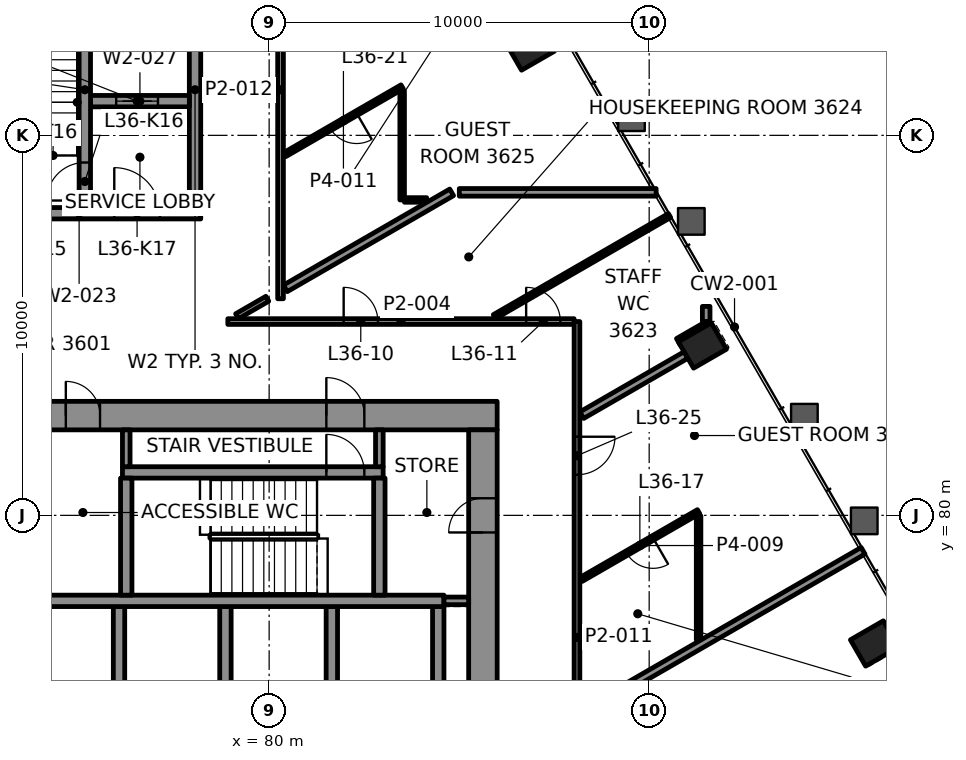
"""IFC4 building model, lengths in metres.
Left out: names, types, materials, properties, quantities, classifications, styles, units other than length and angle.
Written with IfcOpenShell. Run it as: python <this file> out.ifc"""

import sys

from ifc_helpers import new_model, si_unit, direction, frame, frame_2d, origin, origin_2d, place, context, subcontext, project, spatial, rectangle, hollow_rectangle, extrude, element, fill, save


model = new_model("IFC4")
c1 = context("Model", 3, precision=1e-05, world=origin(), true_north=direction((0.0, 1.0)))
c2 = subcontext(c1, "Body", "Model", "MODEL_VIEW")
j1 = project(units=[si_unit("LENGTHUNIT", "METRE"), si_unit("PLANEANGLEUNIT", "RADIAN")], contexts=[c1])
p1 = place(None, origin())
s1 = spatial("IfcSite", under=j1, at=p1, CompositionType="ELEMENT")
p2 = place(p1, origin())
s2 = spatial("IfcBuilding", under=s1, at=p2, CompositionType="ELEMENT")
p3 = place(p2, frame((0.0, 0.0, 159.7)))
s3 = spatial("IfcBuildingStorey", under=s2, at=p3, CompositionType="ELEMENT", Elevation=159.7)
for number, where, z_axis, x_axis in (
    (1, (95.928, 76.628, -0.0), (0.0, 0.0, 1.0), (-0.5, 0.866, 0.0)),
    (2, (91.402, 84.469, -0.0), (0.0, 0.0, 1.0), (-0.5, 0.866, 0.0)),
    (3, (86.875, 92.31, -0.0), (0.0, 0.0, 1.0), (-0.5, 0.866, 0.0)),
):
    element("IfcColumn", number, at=place(p3, frame(where, z_axis=z_axis, x_axis=x_axis)), inside=s3, PredefinedType="COLUMN", context=c2, shape_type="SweptSolid", body=[
        extrude(hollow_rectangle(XDim=0.8, YDim=1.0, WallThickness=0.05, at=origin_2d()), origin(), (0.0, 0.0, 1.0), 3.9),
    ])
p4 = place(p3, frame((64.0, 82.625, 0.0), z_axis=(0.0, 0.0, 1.0), x_axis=(1.0, 0.0, 0.0)))
e4 = element("IfcWall", 4, at=p4, inside=s3, PredefinedType="SHEAR", context=c2, shape_type="SweptSolid", body=[
    extrude(rectangle(XDim=22.0, YDim=0.75, at=frame_2d((11.0, 0.0))), origin(), (0.0, 0.0, 1.0), 3.7),
])
p5 = place(p4, frame((3.695, 0.0, 0.0)))
e5 = element("IfcOpeningElement", 5, at=p5, cuts=e4, PredefinedType="OPENING", context=c2, shape_type="SweptSolid", body=[
    extrude(rectangle(XDim=1.0, YDim=2.1, at=frame_2d((0.5, 1.05))), frame((0.0, 0.385, 0.0), z_axis=(0.0, -1.0, 0.0), x_axis=(1.0, 0.0, 0.0)), (0.0, 0.0, 1.0), 0.77),
])
p6 = place(p4, frame((17.505, 0.0, 0.0)))
e6 = element("IfcOpeningElement", 6, at=p6, cuts=e4, PredefinedType="OPENING", context=c2, shape_type="SweptSolid", body=[
    extrude(rectangle(XDim=1.0, YDim=2.1, at=frame_2d((0.5, 1.05))), frame((0.0, 0.385, 0.0), z_axis=(0.0, -1.0, 0.0), x_axis=(1.0, 0.0, 0.0)), (0.0, 0.0, 1.0), 0.77),
])
p7 = place(p4, frame((10.65, 0.0, 0.0)))
e7 = element("IfcOpeningElement", 7, at=p7, cuts=e4, PredefinedType="OPENING", context=c2, shape_type="SweptSolid", body=[
    extrude(rectangle(XDim=0.9, YDim=2.1, at=frame_2d((0.45, 1.05))), frame((0.0, 0.385, 0.0), z_axis=(0.0, -1.0, 0.0), x_axis=(1.0, 0.0, 0.0)), (0.0, 0.0, 1.0), 0.77),
])
p8 = place(p3, frame((85.625, 67.75, 0.0), z_axis=(0.0, 0.0, 1.0), x_axis=(0.0, 1.0, 0.0)))
e8 = element("IfcWall", 8, at=p8, inside=s3, PredefinedType="SHEAR", context=c2, shape_type="SweptSolid", body=[
    extrude(rectangle(XDim=14.5, YDim=0.75, at=frame_2d((7.25, 0.0))), origin(), (0.0, 0.0, 1.0), 3.7),
])
p9 = place(p8, frame((4.65, 0.0, 0.0)))
e9 = element("IfcOpeningElement", 9, at=p9, cuts=e8, PredefinedType="OPENING", context=c2, shape_type="SweptSolid", body=[
    extrude(rectangle(XDim=1.8, YDim=2.1, at=frame_2d((0.9, 1.05))), frame((0.0, 0.385, 0.0), z_axis=(0.0, -1.0, 0.0), x_axis=(1.0, 0.0, 0.0)), (0.0, 0.0, 1.0), 0.77),
])
p10 = place(p8, frame((11.8, 0.0, 0.0)))
e10 = element("IfcOpeningElement", 10, at=p10, cuts=e8, PredefinedType="OPENING", context=c2, shape_type="SweptSolid", body=[
    extrude(rectangle(XDim=0.9, YDim=2.1, at=frame_2d((0.45, 1.05))), frame((0.0, 0.385, 0.0), z_axis=(0.0, -1.0, 0.0), x_axis=(1.0, 0.0, 0.0)), (0.0, 0.0, 1.0), 0.77),
])
for number, where, z_axis, x_axis in (
    (11, (76.05, 75.0, 0.0), (0.0, 0.0, 1.0), (0.0, 1.0, 0.0)),
    (12, (78.85, 75.0, 0.0), (0.0, 0.0, 1.0), (0.0, 1.0, 0.0)),
    (13, (81.65, 75.0, 0.0), (0.0, 0.0, 1.0), (0.0, 1.0, 0.0)),
    (14, (84.45, 75.0, 0.0), (0.0, 0.0, 1.0), (0.0, 1.0, 0.0)),
):
    element("IfcWall", number, at=place(p3, frame(where, z_axis=z_axis, x_axis=x_axis)), inside=s3, PredefinedType="SHEAR", context=c2, shape_type="SweptSolid", body=[
        extrude(rectangle(XDim=2.6, YDim=0.3, at=frame_2d((1.3, 0.0))), origin(), (0.0, 0.0, 1.0), 3.7),
    ])
p11 = place(p3, frame((67.15, 77.75, 0.0), z_axis=(0.0, 0.0, 1.0), x_axis=(1.0, 0.0, 0.0)))
e15 = element("IfcWall", 15, at=p11, inside=s3, PredefinedType="SHEAR", context=c2, shape_type="SweptSolid", body=[
    extrude(rectangle(XDim=17.45, YDim=0.3, at=frame_2d((8.725, 0.0))), origin(), (0.0, 0.0, 1.0), 3.7),
])
p12 = place(p11, frame((0.545, 0.0, 0.0)))
e16 = element("IfcOpeningElement", 16, at=p12, cuts=e15, PredefinedType="OPENING", context=c2, shape_type="SweptSolid", body=[
    extrude(rectangle(XDim=1.0, YDim=2.1, at=frame_2d((0.5, 1.05))), frame((0.0, 0.16, 0.0), z_axis=(0.0, -1.0, 0.0), x_axis=(1.0, 0.0, 0.0)), (0.0, 0.0, 1.0), 0.32),
])
p13 = place(p3, frame((76.14, 81.13, 0.0), z_axis=(0.0, 0.0, 1.0), x_axis=(1.0, 0.0, 0.0)))
e17 = element("IfcWall", 17, at=p13, inside=s3, PredefinedType="SHEAR", context=c2, shape_type="SweptSolid", body=[
    extrude(rectangle(XDim=6.86, YDim=0.3, at=frame_2d((3.43, 0.0))), origin(), (0.0, 0.0, 1.0), 3.7),
])
p14 = place(p13, frame((5.365, 0.0, 0.0)))
e18 = element("IfcOpeningElement", 18, at=p14, cuts=e17, PredefinedType="OPENING", context=c2, shape_type="SweptSolid", body=[
    extrude(rectangle(XDim=1.0, YDim=2.1, at=frame_2d((0.5, 1.05))), frame((0.0, 0.16, 0.0), z_axis=(0.0, -1.0, 0.0), x_axis=(1.0, 0.0, 0.0)), (0.0, 0.0, 1.0), 0.32),
])
for number, where, z_axis, x_axis in (
    (19, (76.24, 77.9, 0.0), (0.0, 0.0, 1.0), (0.0, 1.0, 0.0)),
    (20, (82.9, 77.9, 0.0), (0.0, 0.0, 1.0), (0.0, 1.0, 0.0)),
):
    element("IfcWall", number, at=place(p3, frame(where, z_axis=z_axis, x_axis=x_axis)), inside=s3, PredefinedType="SHEAR", context=c2, shape_type="SweptSolid", body=[
        extrude(rectangle(XDim=3.08, YDim=0.3, at=frame_2d((1.54, 0.0))), origin(), (0.0, 0.0, 1.0), 3.7),
    ])
p15 = place(p3, frame((71.8, 87.95, 0.0), z_axis=(0.0, 0.0, 1.0), x_axis=(1.0, 0.0, 0.0)))
e21 = element("IfcWall", 21, at=p15, inside=s3, PredefinedType="SHEAR", context=c2, shape_type="SweptSolid", body=[
    extrude(rectangle(XDim=6.4, YDim=0.3, at=frame_2d((3.2, 0.0))), origin(), (0.0, 0.0, 1.0), 3.7),
])
p16 = place(p15, frame((1.325, 0.0, 0.0)))
e22 = element("IfcOpeningElement", 22, at=p16, cuts=e21, PredefinedType="OPENING", context=c2, shape_type="SweptSolid", body=[
    extrude(rectangle(XDim=1.0, YDim=2.1, at=frame_2d((0.5, 1.05))), frame((0.0, 0.16, 0.0), z_axis=(0.0, -1.0, 0.0), x_axis=(1.0, 0.0, 0.0)), (0.0, 0.0, 1.0), 0.32),
])
p17 = place(p15, frame((4.125, 0.0, 0.0)))
e23 = element("IfcOpeningElement", 23, at=p17, cuts=e21, PredefinedType="OPENING", context=c2, shape_type="SweptSolid", body=[
    extrude(rectangle(XDim=1.2, YDim=2.1, at=frame_2d((0.6, 1.05))), frame((0.0, 0.16, 0.0), z_axis=(0.0, -1.0, 0.0), x_axis=(1.0, 0.0, 0.0)), (0.0, 0.0, 1.0), 0.32),
])
p18 = place(p3, frame((78.05, 88.1, 0.0), z_axis=(0.0, 0.0, 1.0), x_axis=(0.0, 1.0, 0.0)))
e24 = element("IfcWall", 24, at=p18, inside=s3, PredefinedType="SHEAR", context=c2, shape_type="SweptSolid", body=[
    extrude(rectangle(XDim=6.2, YDim=0.3, at=frame_2d((3.1, 0.0))), origin(), (0.0, 0.0, 1.0), 3.7),
])
p19 = place(p3, frame((75.3, 90.9, 0.0), z_axis=(0.0, 0.0, 1.0), x_axis=(1.0, 0.0, 0.0)))
e25 = element("IfcWall", 25, at=p19, inside=s3, PredefinedType="SHEAR", context=c2, shape_type="SweptSolid", body=[
    extrude(rectangle(XDim=2.6, YDim=0.3, at=frame_2d((1.3, 0.0))), origin(), (0.0, 0.0, 1.0), 3.7),
])
p20 = place(p19, frame((0.675, 0.0, 0.0)))
e26 = element("IfcOpeningElement", 26, at=p20, cuts=e25, PredefinedType="OPENING", context=c2, shape_type="SweptSolid", body=[
    extrude(rectangle(XDim=1.1, YDim=2.1, at=frame_2d((0.55, 1.05))), frame((0.0, 0.16, 0.0), z_axis=(0.0, -1.0, 0.0), x_axis=(1.0, 0.0, 0.0)), (0.0, 0.0, 1.0), 0.32),
])
p21 = place(p3, frame((75.15, 88.1, 0.0), z_axis=(0.0, 0.0, 1.0), x_axis=(0.0, 1.0, 0.0)))
e27 = element("IfcWall", 27, at=p21, inside=s3, PredefinedType="SHEAR", context=c2, shape_type="SweptSolid", body=[
    extrude(rectangle(XDim=6.2, YDim=0.3, at=frame_2d((3.1, 0.0))), origin(), (0.0, 0.0, 1.0), 3.7),
])
p22 = place(p21, frame((0.185, 0.0, 0.0)))
e28 = element("IfcOpeningElement", 28, at=p22, cuts=e27, PredefinedType="OPENING", context=c2, shape_type="SweptSolid", body=[
    extrude(rectangle(XDim=1.0, YDim=2.1, at=frame_2d((0.5, 1.05))), frame((0.0, 0.16, 0.0), z_axis=(0.0, -1.0, 0.0), x_axis=(1.0, 0.0, 0.0)), (0.0, 0.0, 1.0), 0.32),
])
p23 = place(p3, frame((78.913, 85.1, 0.0), z_axis=(0.0, 0.0, 1.0), x_axis=(1.0, 0.0, 0.0)))
e29 = element("IfcWall", 29, at=p23, inside=s3, PredefinedType="PARTITIONING", context=c2, shape_type="SweptSolid", body=[
    extrude(rectangle(XDim=9.112, YDim=0.15, at=frame_2d((4.556, 0.0))), origin(), (0.0, 0.0, 1.0), 3.1),
])
p24 = place(p23, frame((3.048, 0.0, 0.0)))
e30 = element("IfcOpeningElement", 30, at=p24, cuts=e29, PredefinedType="OPENING", context=c2, shape_type="SweptSolid", body=[
    extrude(rectangle(XDim=0.9, YDim=2.1, at=frame_2d((0.45, 1.05))), frame((0.0, 0.085, 0.0), z_axis=(0.0, -1.0, 0.0), x_axis=(1.0, 0.0, 0.0)), (0.0, 0.0, 1.0), 0.17),
])
p25 = place(p23, frame((7.85, 0.0, 0.0)))
e31 = element("IfcOpeningElement", 31, at=p25, cuts=e29, PredefinedType="OPENING", context=c2, shape_type="SweptSolid", body=[
    extrude(rectangle(XDim=0.9, YDim=2.1, at=frame_2d((0.45, 1.05))), frame((0.0, 0.085, 0.0), z_axis=(0.0, -1.0, 0.0), x_axis=(1.0, 0.0, 0.0)), (0.0, 0.0, 1.0), 0.17),
])
p26 = place(p3, frame((83.56, 88.3, 0.0), z_axis=(0.0, 0.0, 1.0), x_axis=(1.0, 0.0, 0.0)))
e32 = element("IfcWall", 32, at=p26, inside=s3, PredefinedType="PARTITIONING", context=c2, shape_type="SweptSolid", body=[
    extrude(rectangle(XDim=0.585, YDim=0.12, at=frame_2d((0.292, 0.0))), origin(), (0.0, 0.0, 1.0), 3.1),
])
p27 = place(p3, frame((85.004, 88.5, 0.0), z_axis=(0.0, 0.0, 1.0), x_axis=(1.0, 0.0, 0.0)))
e33 = element("IfcWall", 33, at=p27, inside=s3, PredefinedType="PARTITIONING", context=c2, shape_type="SweptSolid", body=[
    extrude(rectangle(XDim=5.179, YDim=0.2, at=frame_2d((2.59, 0.0))), origin(), (0.0, 0.0, 1.0), 2.865),
])
p28 = place(p3, frame((88.227, 74.795, 0.0), z_axis=(0.0, 0.0, 1.0), x_axis=(0.866017652766, 0.500013424917, 0.0)))
e34 = element("IfcWall", 34, at=p28, inside=s3, PredefinedType="PARTITIONING", context=c2, shape_type="SweptSolid", body=[
    extrude(rectangle(XDim=8.546, YDim=0.2, at=frame_2d((4.273, 0.0))), origin(), (0.0, 0.0, 1.0), 2.865),
])
p29 = place(p3, frame((91.3, 80.098, 0.0), z_axis=(0.0, 0.0, 1.0), x_axis=(-0.866028357664, -0.499994883695, 0.0)))
e35 = element("IfcWall", 35, at=p29, inside=s3, PredefinedType="PARTITIONING", context=c2, shape_type="SweptSolid", body=[
    extrude(rectangle(XDim=3.568, YDim=0.12, at=frame_2d((1.784, 0.0))), origin(), (0.0, 0.0, 1.0), 3.1),
])
p30 = place(p29, frame((1.384, 0.0, 0.0)))
e36 = element("IfcOpeningElement", 36, at=p30, cuts=e35, PredefinedType="OPENING", context=c2, shape_type="SweptSolid", body=[
    extrude(rectangle(XDim=0.8, YDim=2.1, at=frame_2d((0.4, 1.05))), frame((0.0, 0.07, 0.0), z_axis=(0.0, -1.0, 0.0), x_axis=(1.0, 0.0, 0.0)), (0.0, 0.0, 1.0), 0.14),
])
p31 = place(p3, frame((88.227, 82.637, 0.0), z_axis=(0.0, 0.0, 1.0), x_axis=(0.866046892487, 0.499962778628, 0.0)))
e37 = element("IfcWall", 37, at=p31, inside=s3, PredefinedType="PARTITIONING", context=c2, shape_type="SweptSolid", body=[
    extrude(rectangle(XDim=3.166, YDim=0.2, at=frame_2d((1.583, 0.0))), origin(), (0.0, 0.0, 1.0), 3.1),
])
p32 = place(p3, frame((90.769, 84.566, 0.0), z_axis=(0.0, 0.0, 1.0), x_axis=(0.865993035835, 0.500056058743, 0.0)))
e38 = element("IfcWall", 38, at=p32, inside=s3, PredefinedType="PARTITIONING", context=c2, shape_type="SweptSolid", body=[
    extrude(rectangle(XDim=0.845, YDim=0.2, at=frame_2d((0.422, 0.0))), origin(), (0.0, 0.0, 1.0), 2.865),
])
p33 = place(p3, frame((85.928, 85.23, 0.0), z_axis=(0.0, 0.0, 1.0), x_axis=(0.866037319036, 0.49997936161, 0.0)))
e39 = element("IfcWall", 39, at=p33, inside=s3, PredefinedType="PARTITIONING", context=c2, shape_type="SweptSolid", body=[
    extrude(rectangle(XDim=5.32, YDim=0.12, at=frame_2d((2.66, 0.0))), origin(), (0.0, 0.0, 1.0), 2.865),
])
p34 = place(p3, frame((79.156, 85.24, 0.0), z_axis=(0.0, 0.0, 1.0), x_axis=(0.866013213425, 0.500021113727, 0.0)))
e40 = element("IfcWall", 40, at=p34, inside=s3, PredefinedType="PARTITIONING", context=c2, shape_type="SweptSolid", body=[
    extrude(rectangle(XDim=0.92, YDim=0.15, at=frame_2d((0.46, 0.0))), origin(), (0.0, 0.0, 1.0), 3.1),
])
p35 = place(p3, frame((80.427, 85.974, 0.0), z_axis=(0.0, 0.0, 1.0), x_axis=(0.866031085144, 0.499990159468, 0.0)))
e41 = element("IfcWall", 41, at=p35, inside=s3, PredefinedType="PARTITIONING", context=c2, shape_type="SweptSolid", body=[
    extrude(rectangle(XDim=5.052, YDim=0.2, at=frame_2d((2.526, 0.0))), origin(), (0.0, 0.0, 1.0), 3.1),
])
p36 = place(p3, frame((83.5, 91.277, 0.0), z_axis=(0.0, 0.0, 1.0), x_axis=(-0.866028357664, -0.499994883695, 0.0)))
e42 = element("IfcWall", 42, at=p36, inside=s3, PredefinedType="PARTITIONING", context=c2, shape_type="SweptSolid", body=[
    extrude(rectangle(XDim=3.568, YDim=0.12, at=frame_2d((1.784, 0.0))), origin(), (0.0, 0.0, 1.0), 3.1),
])
p37 = place(p36, frame((1.384, 0.0, 0.0)))
e43 = element("IfcOpeningElement", 43, at=p37, cuts=e42, PredefinedType="OPENING", context=c2, shape_type="SweptSolid", body=[
    extrude(rectangle(XDim=0.8, YDim=2.1, at=frame_2d((0.4, 1.05))), frame((0.0, 0.07, 0.0), z_axis=(0.0, -1.0, 0.0), x_axis=(1.0, 0.0, 0.0)), (0.0, 0.0, 1.0), 0.14),
])
p38 = place(p3, frame((91.5, 85.104, 0.0), z_axis=(0.0, 0.0, 1.0), x_axis=(0.0, 1.0, 0.0)))
e44 = element("IfcWall", 44, at=p38, inside=s3, PredefinedType="PARTITIONING", context=c2, shape_type="SweptSolid", body=[
    extrude(rectangle(XDim=0.395, YDim=0.2, at=frame_2d((0.198, 0.0))), origin(), (0.0, 0.0, 1.0), 3.1),
])
p39 = place(p3, frame((91.3, 76.725, 0.0), z_axis=(0.0, 0.0, 1.0), x_axis=(0.0, 1.0, 0.0)))
e45 = element("IfcWall", 45, at=p39, inside=s3, PredefinedType="PARTITIONING", context=c2, shape_type="SweptSolid", body=[
    extrude(rectangle(XDim=3.264, YDim=0.12, at=frame_2d((1.632, 0.0))), origin(), (0.0, 0.0, 1.0), 3.1),
])
p40 = place(p3, frame((88.1, 85.1, 0.0), z_axis=(0.0, 0.0, 1.0), x_axis=(0.0, -1.0, 0.0)))
e46 = element("IfcWall", 46, at=p40, inside=s3, PredefinedType="PARTITIONING", context=c2, shape_type="SweptSolid", body=[
    extrude(rectangle(XDim=16.624, YDim=0.15, at=frame_2d((8.312, 0.0))), origin(), (0.0, 0.0, 1.0), 3.1),
])
p41 = place(p40, frame((3.031, 0.0, 0.0)))
e47 = element("IfcOpeningElement", 47, at=p41, cuts=e46, PredefinedType="OPENING", context=c2, shape_type="SweptSolid", body=[
    extrude(rectangle(XDim=1.0, YDim=2.1, at=frame_2d((0.5, 1.05))), frame((0.0, 0.085, 0.0), z_axis=(0.0, -1.0, 0.0), x_axis=(1.0, 0.0, 0.0)), (0.0, 0.0, 1.0), 0.17),
])
p42 = place(p40, frame((10.872, 0.0, 0.0)))
e48 = element("IfcOpeningElement", 48, at=p42, cuts=e46, PredefinedType="OPENING", context=c2, shape_type="SweptSolid", body=[
    extrude(rectangle(XDim=1.0, YDim=2.1, at=frame_2d((0.5, 1.05))), frame((0.0, 0.085, 0.0), z_axis=(0.0, -1.0, 0.0), x_axis=(1.0, 0.0, 0.0)), (0.0, 0.0, 1.0), 0.17),
])
p43 = place(p3, frame((83.5, 88.3, 0.0), z_axis=(0.0, 0.0, 1.0), x_axis=(0.0, 1.0, 0.0)))
e49 = element("IfcWall", 49, at=p43, inside=s3, PredefinedType="PARTITIONING", context=c2, shape_type="SweptSolid", body=[
    extrude(rectangle(XDim=2.868, YDim=0.12, at=frame_2d((1.434, 0.0))), origin(), (0.0, 0.0, 1.0), 3.022),
])
p44 = place(p3, frame((80.3, 96.7, 0.0), z_axis=(0.0, 0.0, 1.0), x_axis=(0.0, -1.0, 0.0)))
e50 = element("IfcWall", 50, at=p44, inside=s3, PredefinedType="PARTITIONING", context=c2, shape_type="SweptSolid", body=[
    extrude(rectangle(XDim=11.0, YDim=0.15, at=frame_2d((5.5, 0.0))), origin(), (0.0, 0.0, 1.0), 3.022),
])
p45 = place(p44, frame((3.452, 0.0, 0.0)))
e51 = element("IfcOpeningElement", 51, at=p45, cuts=e50, PredefinedType="OPENING", context=c2, shape_type="SweptSolid", body=[
    extrude(rectangle(XDim=1.0, YDim=2.1, at=frame_2d((0.5, 1.05))), frame((0.0, 0.085, 0.0), z_axis=(0.0, -1.0, 0.0), x_axis=(1.0, 0.0, 0.0)), (0.0, 0.0, 1.0), 0.17),
])
p46 = place(p3, frame((84.6, 77.75, 0.0), z_axis=(0.0, 0.0, 1.0), x_axis=(1.0, 0.0, 0.0)))
e52 = element("IfcWall", 52, at=p46, inside=s3, PredefinedType="PARTITIONING", context=c2, shape_type="SweptSolid", body=[
    extrude(rectangle(XDim=0.65, YDim=0.2, at=frame_2d((0.325, 0.0))), origin(), (0.0, 0.0, 1.0), 3.7),
])
for number, where, z_axis, x_axis in (
    (53, (76.24, 81.28, 0.0), (0.0, 0.0, 1.0), (0.0, 1.0, 0.0)),
    (54, (82.9, 81.28, 0.0), (0.0, 0.0, 1.0), (0.0, 1.0, 0.0)),
):
    element("IfcWall", number, at=place(p3, frame(where, z_axis=z_axis, x_axis=x_axis)), inside=s3, PredefinedType="PARTITIONING", context=c2, shape_type="SweptSolid", body=[
        extrude(rectangle(XDim=0.97, YDim=0.2, at=frame_2d((0.485, 0.0))), origin(), (0.0, 0.0, 1.0), 3.7),
    ])
p47 = place(p24, origin())
e55 = element("IfcDoor", 55, at=p47, inside=s3, OperationType="SINGLE_SWING_LEFT", PredefinedType="DOOR", context=c2, shape_type="SweptSolid", body=[
    extrude(rectangle(XDim=0.9, YDim=2.1, at=frame_2d((0.45, 1.05))), frame((0.0, 0.025, 0.0), z_axis=(0.0, -1.0, 0.0), x_axis=(1.0, 0.0, 0.0)), (0.0, 0.0, 1.0), 0.05),
])
fill(e30, e55)
p48 = place(p25, origin())
e56 = element("IfcDoor", 56, at=p48, inside=s3, OperationType="SINGLE_SWING_RIGHT", PredefinedType="DOOR", context=c2, shape_type="SweptSolid", body=[
    extrude(rectangle(XDim=0.9, YDim=2.1, at=frame_2d((0.45, 1.05))), frame((0.0, 0.025, 0.0), z_axis=(0.0, -1.0, 0.0), x_axis=(1.0, 0.0, 0.0)), (0.0, 0.0, 1.0), 0.05),
])
fill(e31, e56)
p49 = place(p30, origin())
e57 = element("IfcDoor", 57, at=p49, inside=s3, OperationType="SINGLE_SWING_RIGHT", PredefinedType="DOOR", context=c2, shape_type="SweptSolid", body=[
    extrude(rectangle(XDim=0.8, YDim=2.1, at=frame_2d((0.4, 1.05))), frame((0.0, 0.025, 0.0), z_axis=(0.0, -1.0, 0.0), x_axis=(1.0, 0.0, 0.0)), (0.0, 0.0, 1.0), 0.05),
])
fill(e36, e57)
p50 = place(p37, origin())
e58 = element("IfcDoor", 58, at=p50, inside=s3, OperationType="SINGLE_SWING_RIGHT", PredefinedType="DOOR", context=c2, shape_type="SweptSolid", body=[
    extrude(rectangle(XDim=0.8, YDim=2.1, at=frame_2d((0.4, 1.05))), frame((0.0, 0.025, 0.0), z_axis=(0.0, -1.0, 0.0), x_axis=(1.0, 0.0, 0.0)), (0.0, 0.0, 1.0), 0.05),
])
fill(e43, e58)
p51 = place(p41, origin())
e59 = element("IfcDoor", 59, at=p51, inside=s3, OperationType="SINGLE_SWING_LEFT", PredefinedType="DOOR", context=c2, shape_type="SweptSolid", body=[
    extrude(rectangle(XDim=1.0, YDim=2.1, at=frame_2d((0.5, 1.05))), frame((0.0, 0.025, 0.0), z_axis=(0.0, -1.0, 0.0), x_axis=(1.0, 0.0, 0.0)), (0.0, 0.0, 1.0), 0.05),
])
fill(e47, e59)
p52 = place(p20, origin())
e60 = element("IfcDoor", 60, at=p52, inside=s3, OperationType="DOUBLE_DOOR_SLIDING", PredefinedType="DOOR", context=c2, shape_type="SweptSolid", body=[
    extrude(rectangle(XDim=1.1, YDim=2.1, at=frame_2d((0.55, 1.05))), frame((0.0, 0.025, 0.0), z_axis=(0.0, -1.0, 0.0), x_axis=(1.0, 0.0, 0.0)), (0.0, 0.0, 1.0), 0.05),
])
fill(e26, e60)
p53 = place(p14, origin())
e61 = element("IfcDoor", 61, at=p53, inside=s3, OperationType="SINGLE_SWING_RIGHT", PredefinedType="DOOR", context=c2, shape_type="SweptSolid", body=[
    extrude(rectangle(XDim=1.0, YDim=2.1, at=frame_2d((0.5, 1.05))), frame((0.0, 0.025, 0.0), z_axis=(0.0, -1.0, 0.0), x_axis=(1.0, 0.0, 0.0)), (0.0, 0.0, 1.0), 0.05),
])
fill(e18, e61)
p54 = place(p6, origin())
e62 = element("IfcDoor", 62, at=p54, inside=s3, OperationType="SINGLE_SWING_LEFT", PredefinedType="DOOR", context=c2, shape_type="SweptSolid", body=[
    extrude(rectangle(XDim=1.0, YDim=2.1, at=frame_2d((0.5, 1.05))), frame((0.0, 0.095, 0.0), z_axis=(0.0, -1.0, 0.0), x_axis=(1.0, 0.0, 0.0)), (0.0, 0.0, 1.0), 0.19),
])
fill(e6, e62)
p55 = place(p22, origin())
e63 = element("IfcDoor", 63, at=p55, inside=s3, OperationType="SINGLE_SWING_LEFT", PredefinedType="DOOR", context=c2, shape_type="SweptSolid", body=[
    extrude(rectangle(XDim=1.0, YDim=2.1, at=frame_2d((0.5, 1.05))), frame((0.0, 0.025, 0.0), z_axis=(0.0, -1.0, 0.0), x_axis=(1.0, 0.0, 0.0)), (0.0, 0.0, 1.0), 0.05),
])
fill(e28, e63)
p56 = place(p17, origin())
e64 = element("IfcDoor", 64, at=p56, inside=s3, OperationType="SINGLE_SWING_RIGHT", PredefinedType="DOOR", context=c2, shape_type="SweptSolid", body=[
    extrude(rectangle(XDim=1.2, YDim=2.1, at=frame_2d((0.6, 1.05))), frame((0.0, 0.025, 0.0), z_axis=(0.0, -1.0, 0.0), x_axis=(1.0, 0.0, 0.0)), (0.0, 0.0, 1.0), 0.05),
])
fill(e23, e64)
p57 = place(p7, origin())
e65 = element("IfcDoor", 65, at=p57, inside=s3, OperationType="SINGLE_SWING_LEFT", PredefinedType="DOOR", context=c2, shape_type="SweptSolid", body=[
    extrude(rectangle(XDim=0.9, YDim=2.1, at=frame_2d((0.45, 1.05))), frame((0.0, 0.095, 0.0), z_axis=(0.0, -1.0, 0.0), x_axis=(1.0, 0.0, 0.0)), (0.0, 0.0, 1.0), 0.19),
])
fill(e7, e65)
p58 = place(p10, origin())
e66 = element("IfcDoor", 66, at=p58, inside=s3, OperationType="SINGLE_SWING_RIGHT", PredefinedType="DOOR", context=c2, shape_type="SweptSolid", body=[
    extrude(rectangle(XDim=0.9, YDim=2.1, at=frame_2d((0.45, 1.05))), frame((0.0, 0.095, 0.0), z_axis=(0.0, -1.0, 0.0), x_axis=(1.0, 0.0, 0.0)), (0.0, 0.0, 1.0), 0.19),
])
fill(e10, e66)
save(model, sys.argv[1])
